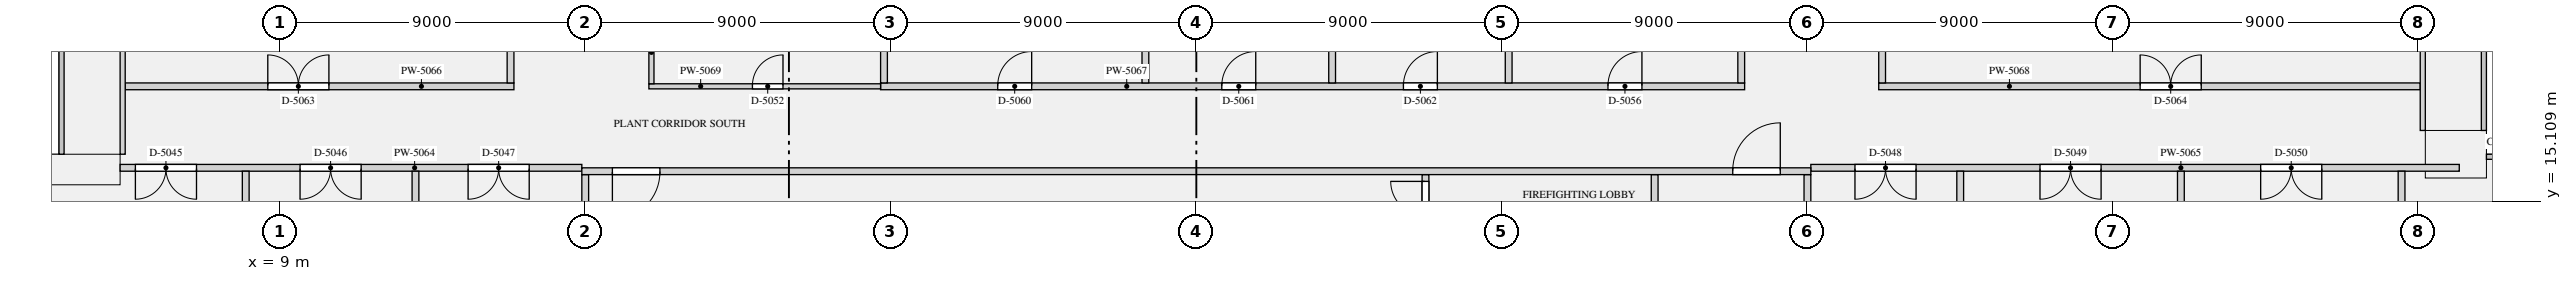
"""IFC4 building model, lengths in metres.
Left out: names, types, materials, properties, quantities, classifications, styles, units other than length and angle.
Written with IfcOpenShell. Run it as: python <this file> out.ifc"""

import sys

from ifc_helpers import new_model, si_unit, direction, frame, frame_2d, origin, origin_2d, place, context, subcontext, project, spatial, rectangle, extrude, element, fill, save


model = new_model("IFC4")
c1 = context("Model", 3, precision=1e-05, world=origin(), true_north=direction((0.0, 1.0)))
c2 = subcontext(c1, "Body", "Model", "MODEL_VIEW")
j1 = project(units=[si_unit("LENGTHUNIT", "METRE"), si_unit("PLANEANGLEUNIT", "RADIAN")], contexts=[c1])
p1 = place(None, origin())
s1 = spatial("IfcSite", under=j1, at=p1, CompositionType="ELEMENT")
p2 = place(p1, origin())
s2 = spatial("IfcBuilding", under=s1, at=p2, CompositionType="ELEMENT")
p3 = place(p2, frame((0.0, 0.0, 15.5)))
s3 = spatial("IfcBuildingStorey", under=s2, at=p3, CompositionType="ELEMENT", Elevation=15.5)
p4 = place(p3, frame((73.1, 16.5, 0.0), z_axis=(0.0, 0.0, 1.0), x_axis=(0.0, 1.0, 0.0)))
e1 = element("IfcColumn", 1, at=p4, inside=s3, PredefinedType="USERDEFINED", context=c2, shape_type="SweptSolid", body=[
    extrude(rectangle(XDim=1.4, YDim=1.8, at=origin_2d()), origin(), (0.0, 0.0, 1.0), 4.0),
])
p5 = place(p3, frame((3.05, 16.05, 0.0), z_axis=(0.0, 0.0, 1.0), x_axis=(-1.0, 0.0, 0.0)))
e2 = element("IfcColumn", 2, at=p5, inside=s3, PredefinedType="USERDEFINED", context=c2, shape_type="SweptSolid", body=[
    extrude(rectangle(XDim=2.5, YDim=0.9, at=origin_2d()), origin(), (0.0, 0.0, 1.0), 4.0),
])
p6 = place(p3, frame((18.0, 12.5, 0.0), z_axis=(0.0, 0.0, 1.0), x_axis=(0.0, 1.0, 0.0)))
e3 = element("IfcWall", 3, at=p6, inside=s3, PredefinedType="PARTITIONING", context=c2, shape_type="SweptSolid", body=[
    extrude(rectangle(XDim=3.4, YDim=0.2, at=frame_2d((1.7, 0.0))), origin(), (0.0, 0.0, 1.0), 3.68),
])
p7 = place(p3, frame((42.75, 12.5, 0.0), z_axis=(0.0, 0.0, 1.0), x_axis=(0.0, 1.0, 0.0)))
e4 = element("IfcWall", 4, at=p7, inside=s3, PredefinedType="PARTITIONING", context=c2, shape_type="SweptSolid", body=[
    extrude(rectangle(XDim=3.4, YDim=0.2, at=frame_2d((1.7, 0.0))), origin(), (0.0, 0.0, 1.0), 3.68),
])
p8 = place(p7, frame((2.2, 0.0, 0.0)))
e5 = element("IfcOpeningElement", 5, at=p8, cuts=e4, PredefinedType="OPENING", context=c2, shape_type="SweptSolid", body=[
    extrude(rectangle(XDim=1.0, YDim=2.1, at=frame_2d((0.5, 1.05))), frame((0.0, 0.11, 0.0), z_axis=(0.0, -1.0, 0.0), x_axis=(1.0, 0.0, 0.0)), (0.0, 0.0, 1.0), 0.22),
])
p9 = place(p3, frame((49.5, 12.5, 0.0), z_axis=(0.0, 0.0, 1.0), x_axis=(0.0, 1.0, 0.0)))
e6 = element("IfcWall", 6, at=p9, inside=s3, PredefinedType="PARTITIONING", context=c2, shape_type="SweptSolid", body=[
    extrude(rectangle(XDim=3.4, YDim=0.2, at=frame_2d((1.7, 0.0))), origin(), (0.0, 0.0, 1.0), 3.68),
])
p10 = place(p9, frame((1.15, 0.0, 0.0)))
e7 = element("IfcOpeningElement", 7, at=p10, cuts=e6, PredefinedType="OPENING", context=c2, shape_type="SweptSolid", body=[
    extrude(rectangle(XDim=1.1, YDim=2.1, at=frame_2d((0.55, 1.05))), frame((0.0, 0.11, 0.0), z_axis=(0.0, -1.0, 0.0), x_axis=(1.0, 0.0, 0.0)), (0.0, 0.0, 1.0), 0.22),
])
p11 = place(p3, frame((54.0, 12.5, 0.0), z_axis=(0.0, 0.0, 1.0), x_axis=(0.0, 1.0, 0.0)))
e8 = element("IfcWall", 8, at=p11, inside=s3, PredefinedType="PARTITIONING", context=c2, shape_type="SweptSolid", body=[
    extrude(rectangle(XDim=3.4, YDim=0.2, at=frame_2d((1.7, 0.0))), origin(), (0.0, 0.0, 1.0), 3.68),
])
p12 = place(p3, frame((17.9, 16.0, 0.0), z_axis=(0.0, 0.0, 1.0), x_axis=(1.0, 0.0, 0.0)))
e9 = element("IfcWall", 9, at=p12, inside=s3, PredefinedType="PARTITIONING", context=c2, shape_type="SweptSolid", body=[
    extrude(rectangle(XDim=36.2, YDim=0.2, at=frame_2d((18.1, 0.0))), origin(), (0.0, 0.0, 1.0), 3.68),
])
p13 = place(p12, frame((0.9, 0.0, 0.0)))
e10 = element("IfcOpeningElement", 10, at=p13, cuts=e9, PredefinedType="OPENING", context=c2, shape_type="SweptSolid", body=[
    extrude(rectangle(XDim=1.4, YDim=2.1, at=frame_2d((0.7, 1.05))), frame((0.0, 0.11, 0.0), z_axis=(0.0, -1.0, 0.0), x_axis=(1.0, 0.0, 0.0)), (0.0, 0.0, 1.0), 0.22),
])
p14 = place(p12, frame((33.9, 0.0, 0.0)))
e11 = element("IfcOpeningElement", 11, at=p14, cuts=e9, PredefinedType="OPENING", context=c2, shape_type="SweptSolid", body=[
    extrude(rectangle(XDim=1.4, YDim=2.1, at=frame_2d((0.7, 1.05))), frame((0.0, 0.11, 0.0), z_axis=(0.0, -1.0, 0.0), x_axis=(1.0, 0.0, 0.0)), (0.0, 0.0, 1.0), 0.22),
])
p15 = place(p3, frame((4.3, 16.1, 0.0), z_axis=(0.0, 0.0, 1.0), x_axis=(1.0, 0.0, 0.0)))
e12 = element("IfcWall", 12, at=p15, inside=s3, PredefinedType="PARTITIONING", context=c2, shape_type="SweptSolid", body=[
    extrude(rectangle(XDim=13.6, YDim=0.2, at=frame_2d((6.8, 0.0))), origin(), (0.0, 0.0, 1.0), 3.68),
])
p16 = place(p15, frame((0.45, 0.0, 0.0)))
e13 = element("IfcOpeningElement", 13, at=p16, cuts=e12, PredefinedType="OPENING", context=c2, shape_type="SweptSolid", body=[
    extrude(rectangle(XDim=1.8, YDim=2.1, at=frame_2d((0.9, 1.05))), frame((0.0, 0.11, 0.0), z_axis=(0.0, -1.0, 0.0), x_axis=(1.0, 0.0, 0.0)), (0.0, 0.0, 1.0), 0.22),
])
p17 = place(p15, frame((5.3, 0.0, 0.0)))
e14 = element("IfcOpeningElement", 14, at=p17, cuts=e12, PredefinedType="OPENING", context=c2, shape_type="SweptSolid", body=[
    extrude(rectangle(XDim=1.8, YDim=2.1, at=frame_2d((0.9, 1.05))), frame((0.0, 0.11, 0.0), z_axis=(0.0, -1.0, 0.0), x_axis=(1.0, 0.0, 0.0)), (0.0, 0.0, 1.0), 0.22),
])
p18 = place(p15, frame((10.25, 0.0, 0.0)))
e15 = element("IfcOpeningElement", 15, at=p18, cuts=e12, PredefinedType="OPENING", context=c2, shape_type="SweptSolid", body=[
    extrude(rectangle(XDim=1.8, YDim=2.1, at=frame_2d((0.9, 1.05))), frame((0.0, 0.11, 0.0), z_axis=(0.0, -1.0, 0.0), x_axis=(1.0, 0.0, 0.0)), (0.0, 0.0, 1.0), 0.22),
])
p19 = place(p3, frame((54.1, 16.1, 0.0), z_axis=(0.0, 0.0, 1.0), x_axis=(1.0, 0.0, 0.0)))
e16 = element("IfcWall", 16, at=p19, inside=s3, PredefinedType="PARTITIONING", context=c2, shape_type="SweptSolid", body=[
    extrude(rectangle(XDim=19.1, YDim=0.2, at=frame_2d((9.55, 0.0))), origin(), (0.0, 0.0, 1.0), 3.68),
])
p20 = place(p19, frame((1.3, 0.0, 0.0)))
e17 = element("IfcOpeningElement", 17, at=p20, cuts=e16, PredefinedType="OPENING", context=c2, shape_type="SweptSolid", body=[
    extrude(rectangle(XDim=1.8, YDim=2.1, at=frame_2d((0.9, 1.05))), frame((0.0, 0.11, 0.0), z_axis=(0.0, -1.0, 0.0), x_axis=(1.0, 0.0, 0.0)), (0.0, 0.0, 1.0), 0.22),
])
p21 = place(p19, frame((6.75, 0.0, 0.0)))
e18 = element("IfcOpeningElement", 18, at=p21, cuts=e16, PredefinedType="OPENING", context=c2, shape_type="SweptSolid", body=[
    extrude(rectangle(XDim=1.8, YDim=2.1, at=frame_2d((0.9, 1.05))), frame((0.0, 0.11, 0.0), z_axis=(0.0, -1.0, 0.0), x_axis=(1.0, 0.0, 0.0)), (0.0, 0.0, 1.0), 0.22),
])
p22 = place(p19, frame((13.25, 0.0, 0.0)))
e19 = element("IfcOpeningElement", 19, at=p22, cuts=e16, PredefinedType="OPENING", context=c2, shape_type="SweptSolid", body=[
    extrude(rectangle(XDim=1.8, YDim=2.1, at=frame_2d((0.9, 1.05))), frame((0.0, 0.11, 0.0), z_axis=(0.0, -1.0, 0.0), x_axis=(1.0, 0.0, 0.0)), (0.0, 0.0, 1.0), 0.22),
])
p23 = place(p3, frame((4.45, 18.5, 0.0), z_axis=(0.0, 0.0, 1.0), x_axis=(1.0, 0.0, 0.0)))
e20 = element("IfcWall", 20, at=p23, inside=s3, PredefinedType="PARTITIONING", context=c2, shape_type="SweptSolid", body=[
    extrude(rectangle(XDim=11.45, YDim=0.2, at=frame_2d((5.725, 0.0))), origin(), (0.0, 0.0, 1.0), 3.68),
])
p24 = place(p23, frame((4.2, 0.0, 0.0)))
e21 = element("IfcOpeningElement", 21, at=p24, cuts=e20, PredefinedType="OPENING", context=c2, shape_type="SweptSolid", body=[
    extrude(rectangle(XDim=1.8, YDim=2.1, at=frame_2d((0.9, 1.05))), frame((0.0, 0.11, 0.0), z_axis=(0.0, -1.0, 0.0), x_axis=(1.0, 0.0, 0.0)), (0.0, 0.0, 1.0), 0.22),
])
p25 = place(p3, frame((26.7, 18.5, 0.0), z_axis=(0.0, 0.0, 1.0), x_axis=(1.0, 0.0, 0.0)))
e22 = element("IfcWall", 22, at=p25, inside=s3, PredefinedType="PARTITIONING", context=c2, shape_type="SweptSolid", body=[
    extrude(rectangle(XDim=25.45, YDim=0.2, at=frame_2d((12.725, 0.0))), origin(), (0.0, 0.0, 1.0), 3.68),
])
p26 = place(p25, frame((21.425, 0.0, 0.0)))
e23 = element("IfcOpeningElement", 23, at=p26, cuts=e22, PredefinedType="OPENING", context=c2, shape_type="SweptSolid", body=[
    extrude(rectangle(XDim=1.0, YDim=2.1, at=frame_2d((0.5, 1.05))), frame((0.0, 0.11, 0.0), z_axis=(0.0, -1.0, 0.0), x_axis=(1.0, 0.0, 0.0)), (0.0, 0.0, 1.0), 0.22),
])
p27 = place(p25, frame((3.45, 0.0, 0.0)))
e24 = element("IfcOpeningElement", 24, at=p27, cuts=e22, PredefinedType="OPENING", context=c2, shape_type="SweptSolid", body=[
    extrude(rectangle(XDim=1.0, YDim=2.1, at=frame_2d((0.5, 1.05))), frame((0.0, 0.11, 0.0), z_axis=(0.0, -1.0, 0.0), x_axis=(1.0, 0.0, 0.0)), (0.0, 0.0, 1.0), 0.22),
])
p28 = place(p25, frame((10.05, 0.0, 0.0)))
e25 = element("IfcOpeningElement", 25, at=p28, cuts=e22, PredefinedType="OPENING", context=c2, shape_type="SweptSolid", body=[
    extrude(rectangle(XDim=1.0, YDim=2.1, at=frame_2d((0.5, 1.05))), frame((0.0, 0.11, 0.0), z_axis=(0.0, -1.0, 0.0), x_axis=(1.0, 0.0, 0.0)), (0.0, 0.0, 1.0), 0.22),
])
p29 = place(p25, frame((15.4, 0.0, 0.0)))
e26 = element("IfcOpeningElement", 26, at=p29, cuts=e22, PredefinedType="OPENING", context=c2, shape_type="SweptSolid", body=[
    extrude(rectangle(XDim=1.0, YDim=2.1, at=frame_2d((0.5, 1.05))), frame((0.0, 0.11, 0.0), z_axis=(0.0, -1.0, 0.0), x_axis=(1.0, 0.0, 0.0)), (0.0, 0.0, 1.0), 0.22),
])
p30 = place(p3, frame((56.1, 18.5, 0.0), z_axis=(0.0, 0.0, 1.0), x_axis=(1.0, 0.0, 0.0)))
e27 = element("IfcWall", 27, at=p30, inside=s3, PredefinedType="PARTITIONING", context=c2, shape_type="SweptSolid", body=[
    extrude(rectangle(XDim=15.95, YDim=0.2, at=frame_2d((7.975, 0.0))), origin(), (0.0, 0.0, 1.0), 3.68),
])
p31 = place(p30, frame((7.7, 0.0, 0.0)))
e28 = element("IfcOpeningElement", 28, at=p31, cuts=e27, PredefinedType="OPENING", context=c2, shape_type="SweptSolid", body=[
    extrude(rectangle(XDim=1.8, YDim=2.1, at=frame_2d((0.9, 1.05))), frame((0.0, 0.11, 0.0), z_axis=(0.0, -1.0, 0.0), x_axis=(1.0, 0.0, 0.0)), (0.0, 0.0, 1.0), 0.22),
])
p32 = place(p3, frame((19.875, 18.5, 0.0), z_axis=(0.0, 0.0, 1.0), x_axis=(1.0, 0.0, 0.0)))
e29 = element("IfcWall", 29, at=p32, inside=s3, PredefinedType="PARTITIONING", context=c2, shape_type="SweptSolid", body=[
    extrude(rectangle(XDim=6.825, YDim=0.15, at=frame_2d((3.413, 0.0))), origin(), (0.0, 0.0, 1.0), 3.68),
])
p33 = place(p32, frame((3.05, 0.0, 0.0)))
e30 = element("IfcOpeningElement", 30, at=p33, cuts=e29, PredefinedType="OPENING", context=c2, shape_type="SweptSolid", body=[
    extrude(rectangle(XDim=0.9, YDim=2.1, at=frame_2d((0.45, 1.05))), frame((0.0, 0.085, 0.0), z_axis=(0.0, -1.0, 0.0), x_axis=(1.0, 0.0, 0.0)), (0.0, 0.0, 1.0), 0.17),
])
p34 = place(p3, frame((8.0, 0.09, 0.0), z_axis=(0.0, 0.0, 1.0), x_axis=(0.0, 1.0, 0.0)))
e31 = element("IfcWall", 31, at=p34, inside=s3, PredefinedType="PARTITIONING", context=c2, shape_type="SweptSolid", body=[
    extrude(rectangle(XDim=15.91, YDim=0.2, at=frame_2d((7.955, 0.0))), origin(), (0.0, 0.0, 1.0), 3.68),
])
for number, where, z_axis, x_axis in (
    (32, (13.0, 1.55, 0.0), (0.0, 0.0, 1.0), (0.0, 1.0, 0.0)),
    (33, (58.5, 1.55, 0.0), (0.0, 0.0, 1.0), (0.0, 1.0, 0.0)),
    (34, (65.0, 1.55, 0.0), (0.0, 0.0, 1.0), (0.0, 1.0, 0.0)),
):
    element("IfcWall", number, at=place(p3, frame(where, z_axis=z_axis, x_axis=x_axis)), inside=s3, PredefinedType="PARTITIONING", context=c2, shape_type="SweptSolid", body=[
        extrude(rectangle(XDim=14.45, YDim=0.2, at=frame_2d((7.225, 0.0))), origin(), (0.0, 0.0, 1.0), 3.68),
    ])
p35 = place(p3, frame((71.5, 5.3, 0.0), z_axis=(0.0, 0.0, 1.0), x_axis=(0.0, 1.0, 0.0)))
e35 = element("IfcWall", 35, at=p35, inside=s3, PredefinedType="PARTITIONING", context=c2, shape_type="SweptSolid", body=[
    extrude(rectangle(XDim=10.7, YDim=0.2, at=frame_2d((5.35, 0.0))), origin(), (0.0, 0.0, 1.0), 3.68),
])
p36 = place(p35, frame((4.7, 0.0, 0.0)))
e36 = element("IfcOpeningElement", 36, at=p36, cuts=e35, PredefinedType="OPENING", context=c2, shape_type="SweptSolid", body=[
    extrude(rectangle(XDim=1.0, YDim=2.1, at=frame_2d((0.5, 1.05))), frame((0.0, 0.11, 0.0), z_axis=(0.0, -1.0, 0.0), x_axis=(1.0, 0.0, 0.0)), (0.0, 0.0, 1.0), 0.22),
])
p37 = place(p3, frame((19.95, 18.575, 0.0), z_axis=(0.0, 0.0, 1.0), x_axis=(0.0, 1.0, 0.0)))
e37 = element("IfcWall", 37, at=p37, inside=s3, PredefinedType="PARTITIONING", context=c2, shape_type="SweptSolid", body=[
    extrude(rectangle(XDim=1.85, YDim=0.15, at=frame_2d((0.925, 0.0))), origin(), (0.0, 0.0, 1.0), 3.68),
])
p38 = place(p3, frame((15.8, 18.6, 0.0), z_axis=(0.0, 0.0, 1.0), x_axis=(0.0, 1.0, 0.0)))
e38 = element("IfcWall", 38, at=p38, inside=s3, PredefinedType="PARTITIONING", context=c2, shape_type="SweptSolid", body=[
    extrude(rectangle(XDim=4.3, YDim=0.2, at=frame_2d((2.15, 0.0))), origin(), (0.0, 0.0, 1.0), 3.68),
])
p39 = place(p3, frame((26.8, 18.6, 0.0), z_axis=(0.0, 0.0, 1.0), x_axis=(0.0, 1.0, 0.0)))
e39 = element("IfcWall", 39, at=p39, inside=s3, PredefinedType="PARTITIONING", context=c2, shape_type="SweptSolid", body=[
    extrude(rectangle(XDim=5.1, YDim=0.2, at=frame_2d((2.55, 0.0))), origin(), (0.0, 0.0, 1.0), 3.68),
])
for number, where, z_axis, x_axis in (
    (40, (34.5, 18.6, 0.0), (0.0, 0.0, 1.0), (0.0, 1.0, 0.0)),
    (41, (40.0, 18.6, 0.0), (0.0, 0.0, 1.0), (0.0, 1.0, 0.0)),
):
    element("IfcWall", number, at=place(p3, frame(where, z_axis=z_axis, x_axis=x_axis)), inside=s3, PredefinedType="PARTITIONING", context=c2, shape_type="SweptSolid", body=[
        extrude(rectangle(XDim=5.304, YDim=0.2, at=frame_2d((2.652, 0.0))), origin(), (0.0, 0.0, 1.0), 3.68),
    ])
for number, where, z_axis, x_axis in (
    (42, (45.2, 18.6, 0.0), (0.0, 0.0, 1.0), (0.0, 1.0, 0.0)),
    (43, (52.05, 18.6, 0.0), (0.0, 0.0, 1.0), (0.0, 1.0, 0.0)),
):
    element("IfcWall", number, at=place(p3, frame(where, z_axis=z_axis, x_axis=x_axis)), inside=s3, PredefinedType="PARTITIONING", context=c2, shape_type="SweptSolid", body=[
        extrude(rectangle(XDim=3.3, YDim=0.2, at=frame_2d((1.65, 0.0))), origin(), (0.0, 0.0, 1.0), 3.68),
    ])
p40 = place(p3, frame((56.2, 18.6, 0.0), z_axis=(0.0, 0.0, 1.0), x_axis=(0.0, 1.0, 0.0)))
e44 = element("IfcWall", 44, at=p40, inside=s3, PredefinedType="PARTITIONING", context=c2, shape_type="SweptSolid", body=[
    extrude(rectangle(XDim=4.3, YDim=0.2, at=frame_2d((2.15, 0.0))), origin(), (0.0, 0.0, 1.0), 3.68),
])
for number, where, z_axis, x_axis in (
    (45, (72.125, 17.2, 0.0), (0.0, 0.0, 1.0), (0.0, 1.0, 0.0)),
    (46, (4.375, 16.5, 0.0), (0.0, 0.0, 1.0), (0.0, 1.0, 0.0)),
):
    element("IfcWall", number, at=place(p3, frame(where, z_axis=z_axis, x_axis=x_axis)), inside=s3, PredefinedType="PARTITIONING", context=c2, shape_type="SweptSolid", body=[
        extrude(rectangle(XDim=11.3, YDim=0.15, at=frame_2d((5.65, 0.0))), origin(), (0.0, 0.0, 1.0), 3.68),
    ])
p41 = place(p8, origin())
e47 = element("IfcDoor", 47, at=p41, inside=s3, OperationType="SINGLE_SWING_RIGHT", PredefinedType="DOOR", context=c2, shape_type="SweptSolid", body=[
    extrude(rectangle(XDim=1.0, YDim=2.1, at=frame_2d((0.5, 1.05))), frame((0.0, 0.025, 0.0), z_axis=(0.0, -1.0, 0.0), x_axis=(1.0, 0.0, 0.0)), (0.0, 0.0, 1.0), 0.05),
])
fill(e5, e47)
p42 = place(p13, frame((1.4, 0.0, 0.0), z_axis=(0.0, 0.0, 1.0), x_axis=(-1.0, 0.0, 0.0)))
e48 = element("IfcDoor", 48, at=p42, inside=s3, OperationType="SINGLE_SWING_RIGHT", PredefinedType="DOOR", context=c2, shape_type="SweptSolid", body=[
    extrude(rectangle(XDim=1.4, YDim=2.1, at=frame_2d((0.7, 1.05))), frame((0.0, 0.025, 0.0), z_axis=(0.0, -1.0, 0.0), x_axis=(1.0, 0.0, 0.0)), (0.0, 0.0, 1.0), 0.05),
])
fill(e10, e48)
p43 = place(p14, origin())
e49 = element("IfcDoor", 49, at=p43, inside=s3, OperationType="SINGLE_SWING_RIGHT", PredefinedType="DOOR", context=c2, shape_type="SweptSolid", body=[
    extrude(rectangle(XDim=1.4, YDim=2.1, at=frame_2d((0.7, 1.05))), frame((0.0, 0.025, 0.0), z_axis=(0.0, -1.0, 0.0), x_axis=(1.0, 0.0, 0.0)), (0.0, 0.0, 1.0), 0.05),
])
fill(e11, e49)
p44 = place(p16, frame((1.8, 0.0, 0.0), z_axis=(0.0, 0.0, 1.0), x_axis=(-1.0, 0.0, 0.0)))
e50 = element("IfcDoor", 50, at=p44, inside=s3, OperationType="DOUBLE_DOOR_SINGLE_SWING", PredefinedType="DOOR", context=c2, shape_type="SweptSolid", body=[
    extrude(rectangle(XDim=1.8, YDim=2.1, at=frame_2d((0.9, 1.05))), frame((0.0, 0.025, 0.0), z_axis=(0.0, -1.0, 0.0), x_axis=(1.0, 0.0, 0.0)), (0.0, 0.0, 1.0), 0.05),
])
fill(e13, e50)
p45 = place(p17, frame((1.8, 0.0, 0.0), z_axis=(0.0, 0.0, 1.0), x_axis=(-1.0, 0.0, 0.0)))
e51 = element("IfcDoor", 51, at=p45, inside=s3, OperationType="DOUBLE_DOOR_SINGLE_SWING", PredefinedType="DOOR", context=c2, shape_type="SweptSolid", body=[
    extrude(rectangle(XDim=1.8, YDim=2.1, at=frame_2d((0.9, 1.05))), frame((0.0, 0.025, 0.0), z_axis=(0.0, -1.0, 0.0), x_axis=(1.0, 0.0, 0.0)), (0.0, 0.0, 1.0), 0.05),
])
fill(e14, e51)
p46 = place(p18, frame((1.8, 0.0, 0.0), z_axis=(0.0, 0.0, 1.0), x_axis=(-1.0, 0.0, 0.0)))
e52 = element("IfcDoor", 52, at=p46, inside=s3, OperationType="DOUBLE_DOOR_SINGLE_SWING", PredefinedType="DOOR", context=c2, shape_type="SweptSolid", body=[
    extrude(rectangle(XDim=1.8, YDim=2.1, at=frame_2d((0.9, 1.05))), frame((0.0, 0.025, 0.0), z_axis=(0.0, -1.0, 0.0), x_axis=(1.0, 0.0, 0.0)), (0.0, 0.0, 1.0), 0.05),
])
fill(e15, e52)
p47 = place(p20, frame((1.8, 0.0, 0.0), z_axis=(0.0, 0.0, 1.0), x_axis=(-1.0, 0.0, 0.0)))
e53 = element("IfcDoor", 53, at=p47, inside=s3, OperationType="DOUBLE_DOOR_SINGLE_SWING", PredefinedType="DOOR", context=c2, shape_type="SweptSolid", body=[
    extrude(rectangle(XDim=1.8, YDim=2.1, at=frame_2d((0.9, 1.05))), frame((0.0, 0.025, 0.0), z_axis=(0.0, -1.0, 0.0), x_axis=(1.0, 0.0, 0.0)), (0.0, 0.0, 1.0), 0.05),
])
fill(e17, e53)
p48 = place(p21, frame((1.8, 0.0, 0.0), z_axis=(0.0, 0.0, 1.0), x_axis=(-1.0, 0.0, 0.0)))
e54 = element("IfcDoor", 54, at=p48, inside=s3, OperationType="DOUBLE_DOOR_SINGLE_SWING", PredefinedType="DOOR", context=c2, shape_type="SweptSolid", body=[
    extrude(rectangle(XDim=1.8, YDim=2.1, at=frame_2d((0.9, 1.05))), frame((0.0, 0.025, 0.0), z_axis=(0.0, -1.0, 0.0), x_axis=(1.0, 0.0, 0.0)), (0.0, 0.0, 1.0), 0.05),
])
fill(e18, e54)
p49 = place(p22, frame((1.8, 0.0, 0.0), z_axis=(0.0, 0.0, 1.0), x_axis=(-1.0, 0.0, 0.0)))
e55 = element("IfcDoor", 55, at=p49, inside=s3, OperationType="DOUBLE_DOOR_SINGLE_SWING", PredefinedType="DOOR", context=c2, shape_type="SweptSolid", body=[
    extrude(rectangle(XDim=1.8, YDim=2.1, at=frame_2d((0.9, 1.05))), frame((0.0, 0.025, 0.0), z_axis=(0.0, -1.0, 0.0), x_axis=(1.0, 0.0, 0.0)), (0.0, 0.0, 1.0), 0.05),
])
fill(e19, e55)
p50 = place(p33, origin())
e56 = element("IfcDoor", 56, at=p50, inside=s3, OperationType="SINGLE_SWING_RIGHT", PredefinedType="DOOR", context=c2, shape_type="SweptSolid", body=[
    extrude(rectangle(XDim=0.9, YDim=2.1, at=frame_2d((0.45, 1.05))), frame((0.0, 0.025, 0.0), z_axis=(0.0, -1.0, 0.0), x_axis=(1.0, 0.0, 0.0)), (0.0, 0.0, 1.0), 0.05),
])
fill(e30, e56)
p51 = place(p26, origin())
e57 = element("IfcDoor", 57, at=p51, inside=s3, OperationType="SINGLE_SWING_RIGHT", PredefinedType="DOOR", context=c2, shape_type="SweptSolid", body=[
    extrude(rectangle(XDim=1.0, YDim=2.1, at=frame_2d((0.5, 1.05))), frame((0.0, 0.025, 0.0), z_axis=(0.0, -1.0, 0.0), x_axis=(1.0, 0.0, 0.0)), (0.0, 0.0, 1.0), 0.05),
])
fill(e23, e57)
p52 = place(p27, origin())
e58 = element("IfcDoor", 58, at=p52, inside=s3, OperationType="SINGLE_SWING_RIGHT", PredefinedType="DOOR", context=c2, shape_type="SweptSolid", body=[
    extrude(rectangle(XDim=1.0, YDim=2.1, at=frame_2d((0.5, 1.05))), frame((0.0, 0.025, 0.0), z_axis=(0.0, -1.0, 0.0), x_axis=(1.0, 0.0, 0.0)), (0.0, 0.0, 1.0), 0.05),
])
fill(e24, e58)
p53 = place(p28, origin())
e59 = element("IfcDoor", 59, at=p53, inside=s3, OperationType="SINGLE_SWING_RIGHT", PredefinedType="DOOR", context=c2, shape_type="SweptSolid", body=[
    extrude(rectangle(XDim=1.0, YDim=2.1, at=frame_2d((0.5, 1.05))), frame((0.0, 0.025, 0.0), z_axis=(0.0, -1.0, 0.0), x_axis=(1.0, 0.0, 0.0)), (0.0, 0.0, 1.0), 0.05),
])
fill(e25, e59)
p54 = place(p29, origin())
e60 = element("IfcDoor", 60, at=p54, inside=s3, OperationType="SINGLE_SWING_RIGHT", PredefinedType="DOOR", context=c2, shape_type="SweptSolid", body=[
    extrude(rectangle(XDim=1.0, YDim=2.1, at=frame_2d((0.5, 1.05))), frame((0.0, 0.025, 0.0), z_axis=(0.0, -1.0, 0.0), x_axis=(1.0, 0.0, 0.0)), (0.0, 0.0, 1.0), 0.05),
])
fill(e26, e60)
p55 = place(p24, origin())
e61 = element("IfcDoor", 61, at=p55, inside=s3, OperationType="DOUBLE_DOOR_SINGLE_SWING", PredefinedType="DOOR", context=c2, shape_type="SweptSolid", body=[
    extrude(rectangle(XDim=1.8, YDim=2.1, at=frame_2d((0.9, 1.05))), frame((0.0, 0.025, 0.0), z_axis=(0.0, -1.0, 0.0), x_axis=(1.0, 0.0, 0.0)), (0.0, 0.0, 1.0), 0.05),
])
fill(e21, e61)
p56 = place(p31, origin())
e62 = element("IfcDoor", 62, at=p56, inside=s3, OperationType="DOUBLE_DOOR_SINGLE_SWING", PredefinedType="DOOR", context=c2, shape_type="SweptSolid", body=[
    extrude(rectangle(XDim=1.8, YDim=2.1, at=frame_2d((0.9, 1.05))), frame((0.0, 0.025, 0.0), z_axis=(0.0, -1.0, 0.0), x_axis=(1.0, 0.0, 0.0)), (0.0, 0.0, 1.0), 0.05),
])
fill(e28, e62)
save(model, sys.argv[1])
